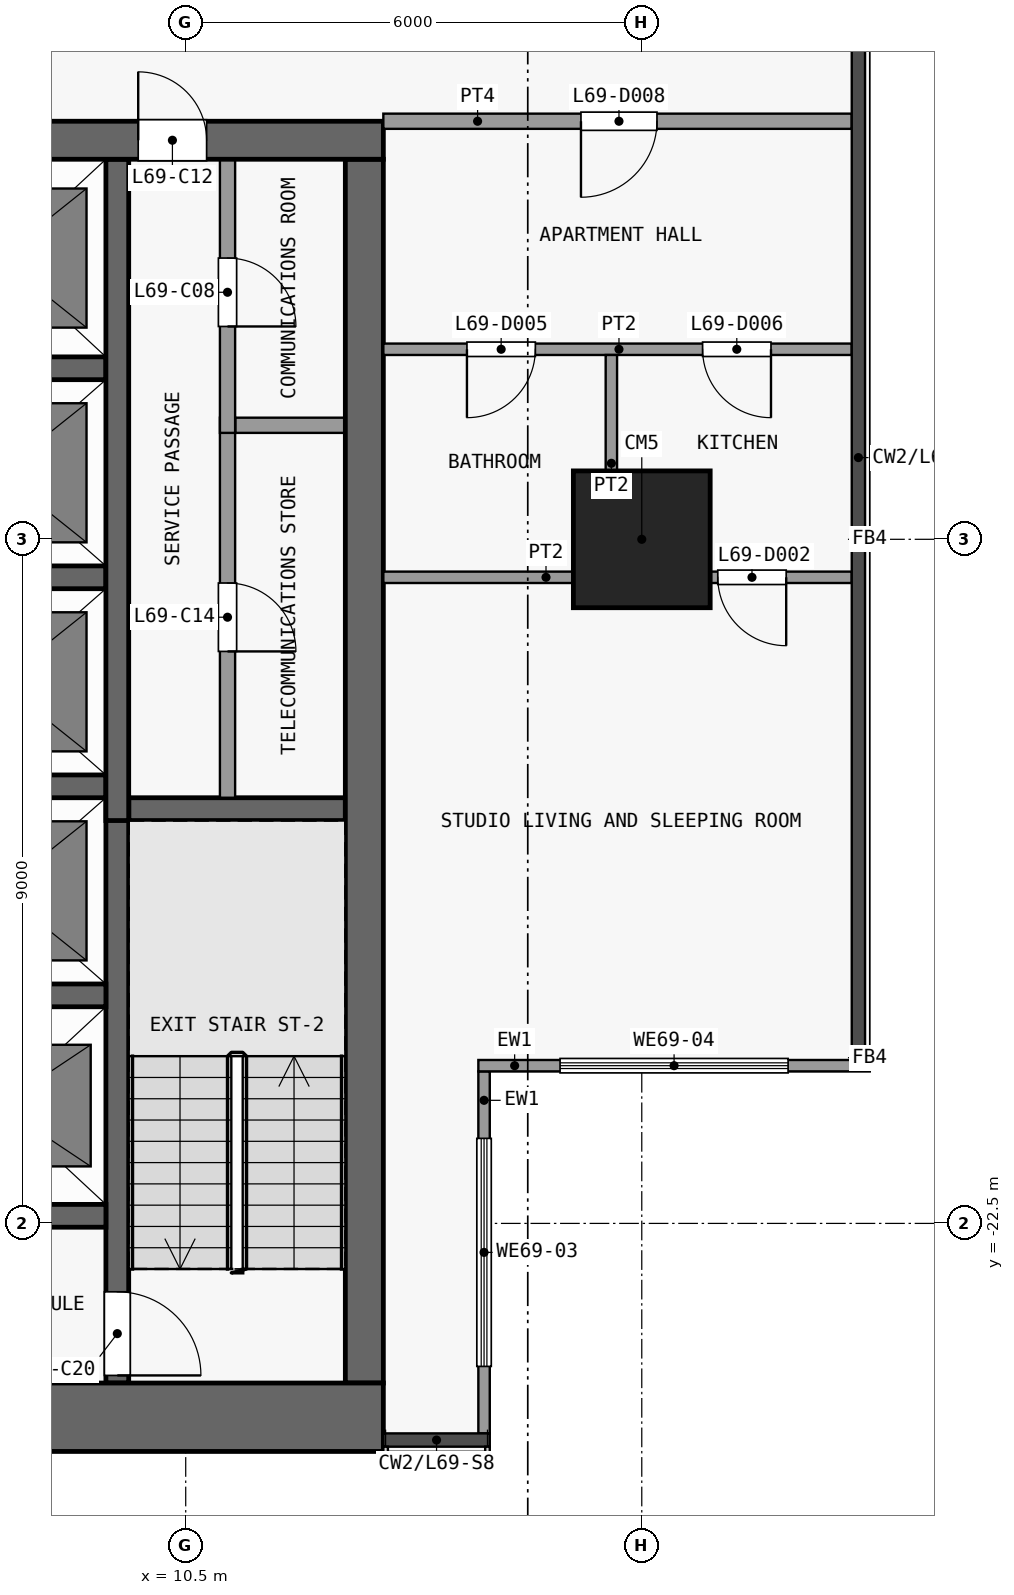
"""IFC4 building model, lengths in metres.
Left out: names, types, materials, properties, quantities, classifications, styles, units other than length and angle.
Written with IfcOpenShell. Run it as: python <this file> out.ifc"""

import sys

from ifc_helpers import new_model, si_unit, direction, frame, frame_2d, origin, origin_2d, place, context, subcontext, project, spatial, rectangle, extrude, element, fill, save


model = new_model("IFC4")
c1 = context("Model", 3, precision=1e-05, world=origin(), true_north=direction((0.0, 1.0)))
c2 = subcontext(c1, "Body", "Model", "MODEL_VIEW")
j1 = project(units=[si_unit("LENGTHUNIT", "METRE"), si_unit("PLANEANGLEUNIT", "RADIAN")], contexts=[c1])
p1 = place(None, origin())
s1 = spatial("IfcSite", under=j1, at=p1, CompositionType="ELEMENT")
p2 = place(p1, origin())
s2 = spatial("IfcBuilding", under=s1, at=p2, CompositionType="ELEMENT")
p3 = place(p2, frame((0.0, 0.0, 273.5)))
s3 = spatial("IfcBuildingStorey", under=s2, at=p3, CompositionType="ELEMENT", Elevation=273.5)
p4 = place(p3, frame((16.5, -13.5, 0.0), z_axis=(0.0, 0.0, 1.0), x_axis=(1.0, 0.0, 0.0)))
e1 = element("IfcColumn", 1, at=p4, inside=s3, PredefinedType="COLUMN", context=c2, shape_type="SweptSolid", body=[
    extrude(rectangle(XDim=1.8, YDim=1.8, at=origin_2d()), origin(), (0.0, 0.0, 1.0), 3.6),
])
p5 = place(p3, frame((-13.1, -25.05, 0.0), z_axis=(0.0, 0.0, 1.0), x_axis=(1.0, 0.0, 0.0)))
e2 = element("IfcWall", 2, at=p5, inside=s3, PredefinedType="SHEAR", context=c2, shape_type="SweptSolid", body=[
    extrude(rectangle(XDim=26.2, YDim=0.9, at=frame_2d((13.1, 0.0))), origin(), (0.0, 0.0, 1.0), 3.3),
])
p6 = place(p3, frame((-13.1, -8.25, 0.0), z_axis=(0.0, 0.0, 1.0), x_axis=(1.0, 0.0, 0.0)))
e3 = element("IfcWall", 3, at=p6, inside=s3, PredefinedType="SHEAR", context=c2, shape_type="SweptSolid", body=[
    extrude(rectangle(XDim=26.2, YDim=0.5, at=frame_2d((13.1, 0.0))), origin(), (0.0, 0.0, 1.0), 3.3),
])
p7 = place(p6, frame((7.4, 0.0, 0.0)))
e4 = element("IfcOpeningElement", 4, at=p7, cuts=e3, PredefinedType="OPENING", context=c2, shape_type="SweptSolid", body=[
    extrude(rectangle(XDim=1.8, YDim=2.1, at=frame_2d((0.9, 1.05))), frame((0.0, 0.26, 0.0), z_axis=(0.0, -1.0, 0.0), x_axis=(1.0, 0.0, 0.0)), (0.0, 0.0, 1.0), 0.52),
])
p8 = place(p6, frame((17.0, 0.0, 0.0)))
e5 = element("IfcOpeningElement", 5, at=p8, cuts=e3, PredefinedType="OPENING", context=c2, shape_type="SweptSolid", body=[
    extrude(rectangle(XDim=1.8, YDim=2.1, at=frame_2d((0.9, 1.05))), frame((0.0, 0.26, 0.0), z_axis=(0.0, -1.0, 0.0), x_axis=(1.0, 0.0, 0.0)), (0.0, 0.0, 1.0), 0.52),
])
p9 = place(p6, frame((2.325, 0.0, 0.0)))
e6 = element("IfcOpeningElement", 6, at=p9, cuts=e3, PredefinedType="OPENING", context=c2, shape_type="SweptSolid", body=[
    extrude(rectangle(XDim=0.9, YDim=2.1, at=frame_2d((0.45, 1.05))), frame((0.0, 0.26, 0.0), z_axis=(0.0, -1.0, 0.0), x_axis=(1.0, 0.0, 0.0)), (0.0, 0.0, 1.0), 0.52),
])
p10 = place(p6, frame((22.975, 0.0, 0.0)))
e7 = element("IfcOpeningElement", 7, at=p10, cuts=e3, PredefinedType="OPENING", context=c2, shape_type="SweptSolid", body=[
    extrude(rectangle(XDim=0.9, YDim=2.1, at=frame_2d((0.45, 1.05))), frame((0.0, 0.26, 0.0), z_axis=(0.0, -1.0, 0.0), x_axis=(1.0, 0.0, 0.0)), (0.0, 0.0, 1.0), 0.52),
])
p11 = place(p3, frame((12.85, -24.6, 0.0), z_axis=(0.0, 0.0, 1.0), x_axis=(0.0, 1.0, 0.0)))
e8 = element("IfcWall", 8, at=p11, inside=s3, PredefinedType="SHEAR", context=c2, shape_type="SweptSolid", body=[
    extrude(rectangle(XDim=16.1, YDim=0.5, at=frame_2d((8.05, 0.0))), origin(), (0.0, 0.0, 1.0), 3.3),
])
for number, where, z_axis, x_axis in (
    (9, (6.65, -22.4, 0.0), (0.0, 0.0, 1.0), (1.0, 0.0, 0.0)),
    (10, (6.65, -19.5, 0.0), (0.0, 0.0, 1.0), (1.0, 0.0, 0.0)),
):
    element("IfcWall", number, at=place(p3, frame(where, z_axis=z_axis, x_axis=x_axis)), inside=s3, PredefinedType="SHEAR", context=c2, shape_type="SweptSolid", body=[
        extrude(rectangle(XDim=2.8, YDim=0.3, at=frame_2d((1.4, 0.0))), origin(), (0.0, 0.0, 1.0), 3.3),
    ])
p12 = place(p3, frame((9.75, -17.05, 0.0), z_axis=(0.0, 0.0, 1.0), x_axis=(1.0, 0.0, 0.0)))
e11 = element("IfcWall", 11, at=p12, inside=s3, PredefinedType="SHEAR", context=c2, shape_type="SweptSolid", body=[
    extrude(rectangle(XDim=2.85, YDim=0.3, at=frame_2d((1.425, 0.0))), origin(), (0.0, 0.0, 1.0), 3.3),
])
for number, where, z_axis, x_axis in (
    (12, (6.65, -16.75, 0.0), (0.0, 0.0, 1.0), (1.0, 0.0, 0.0)),
    (13, (6.65, -14.0, 0.0), (0.0, 0.0, 1.0), (1.0, 0.0, 0.0)),
):
    element("IfcWall", number, at=place(p3, frame(where, z_axis=z_axis, x_axis=x_axis)), inside=s3, PredefinedType="SHEAR", context=c2, shape_type="SweptSolid", body=[
        extrude(rectangle(XDim=2.8, YDim=0.3, at=frame_2d((1.4, 0.0))), origin(), (0.0, 0.0, 1.0), 3.3),
    ])
p13 = place(p3, frame((11.15, -12.0, 0.0), z_axis=(0.0, 0.0, 1.0), x_axis=(1.0, 0.0, 0.0)))
e14 = element("IfcWall", 14, at=p13, inside=s3, PredefinedType="PARTITIONING", context=c2, shape_type="SweptSolid", body=[
    extrude(rectangle(XDim=1.45, YDim=0.2, at=frame_2d((0.725, 0.0))), origin(), (0.0, 0.0, 1.0), 3.3),
])
p14 = place(p3, frame((6.65, -11.25, 0.0), z_axis=(0.0, 0.0, 1.0), x_axis=(1.0, 0.0, 0.0)))
e15 = element("IfcWall", 15, at=p14, inside=s3, PredefinedType="SHEAR", context=c2, shape_type="SweptSolid", body=[
    extrude(rectangle(XDim=2.8, YDim=0.3, at=frame_2d((1.4, 0.0))), origin(), (0.0, 0.0, 1.0), 3.3),
])
p15 = place(p3, frame((9.6, -16.9, 0.0), z_axis=(0.0, 0.0, 1.0), x_axis=(0.0, -1.0, 0.0)))
e16 = element("IfcWall", 16, at=p15, inside=s3, PredefinedType="SHEAR", context=c2, shape_type="SweptSolid", body=[
    extrude(rectangle(XDim=7.7, YDim=0.3, at=frame_2d((3.85, 0.0))), origin(), (0.0, 0.0, 1.0), 3.3),
])
p16 = place(p15, frame((6.5, 0.0, 0.0)))
e17 = element("IfcOpeningElement", 17, at=p16, cuts=e16, PredefinedType="OPENING", context=c2, shape_type="SweptSolid", body=[
    extrude(rectangle(XDim=1.1, YDim=2.1, at=frame_2d((0.55, 1.05))), frame((0.0, 0.16, 0.0), z_axis=(0.0, -1.0, 0.0), x_axis=(1.0, 0.0, 0.0)), (0.0, 0.0, 1.0), 0.32),
])
p17 = place(p3, frame((9.6, -17.2, 0.0), z_axis=(0.0, 0.0, 1.0), x_axis=(0.0, 1.0, 0.0)))
e18 = element("IfcWall", 18, at=p17, inside=s3, PredefinedType="SHEAR", context=c2, shape_type="SweptSolid", body=[
    extrude(rectangle(XDim=8.7, YDim=0.3, at=frame_2d((4.35, 0.0))), origin(), (0.0, 0.0, 1.0), 3.3),
])
p18 = place(p3, frame((11.05, -11.9, 0.0), z_axis=(0.0, 0.0, 1.0), x_axis=(0.0, -1.0, 0.0)))
e19 = element("IfcWall", 19, at=p18, inside=s3, PredefinedType="PARTITIONING", context=c2, shape_type="SweptSolid", body=[
    extrude(rectangle(XDim=5.0, YDim=0.2, at=frame_2d((2.5, 0.0))), origin(), (0.0, 0.0, 1.0), 3.3),
])
p19 = place(p18, frame((2.175, 0.0, 0.0)))
e20 = element("IfcOpeningElement", 20, at=p19, cuts=e19, PredefinedType="OPENING", context=c2, shape_type="SweptSolid", body=[
    extrude(rectangle(XDim=0.9, YDim=2.1, at=frame_2d((0.45, 1.05))), frame((0.0, 0.11, 0.0), z_axis=(0.0, -1.0, 0.0), x_axis=(1.0, 0.0, 0.0)), (0.0, 0.0, 1.0), 0.22),
])
p20 = place(p3, frame((11.05, -8.5, 0.0), z_axis=(0.0, 0.0, 1.0), x_axis=(0.0, -1.0, 0.0)))
e21 = element("IfcWall", 21, at=p20, inside=s3, PredefinedType="PARTITIONING", context=c2, shape_type="SweptSolid", body=[
    extrude(rectangle(XDim=3.6, YDim=0.2, at=frame_2d((1.8, 0.0))), origin(), (0.0, 0.0, 1.0), 3.3),
])
p21 = place(p20, frame((1.3, 0.0, 0.0)))
e22 = element("IfcOpeningElement", 22, at=p21, cuts=e21, PredefinedType="OPENING", context=c2, shape_type="SweptSolid", body=[
    extrude(rectangle(XDim=0.9, YDim=2.1, at=frame_2d((0.45, 1.05))), frame((0.0, 0.11, 0.0), z_axis=(0.0, -1.0, 0.0), x_axis=(1.0, 0.0, 0.0)), (0.0, 0.0, 1.0), 0.22),
])
p22 = place(p3, frame((14.425, -20.5, 0.0), z_axis=(0.0, 0.0, 1.0), x_axis=(0.0, -1.0, 0.0)))
e23 = element("IfcWall", 23, at=p22, inside=s3, PredefinedType="SOLIDWALL", context=c2, shape_type="SweptSolid", body=[
    extrude(rectangle(XDim=4.762, YDim=0.15, at=frame_2d((2.381, 0.0))), origin(), (0.0, 0.0, 1.0), 3.3),
])
p23 = place(p22, frame((0.881, 0.0, 0.9)))
e24 = element("IfcOpeningElement", 24, at=p23, cuts=e23, PredefinedType="OPENING", context=c2, shape_type="SweptSolid", body=[
    extrude(rectangle(XDim=3.0, YDim=2.4, at=frame_2d((1.5, 1.2))), frame((0.0, 0.085, 0.0), z_axis=(0.0, -1.0, 0.0), x_axis=(1.0, 0.0, 0.0)), (0.0, 0.0, 1.0), 0.17),
])
p24 = place(p3, frame((19.5, -20.425, 0.0), z_axis=(0.0, 0.0, 1.0), x_axis=(-1.0, 0.0, 0.0)))
e25 = element("IfcWall", 25, at=p24, inside=s3, PredefinedType="SOLIDWALL", context=c2, shape_type="SweptSolid", body=[
    extrude(rectangle(XDim=5.15, YDim=0.15, at=frame_2d((2.575, 0.0))), origin(), (0.0, 0.0, 1.0), 3.3),
])
p25 = place(p24, frame((1.075, 0.0, 0.9)))
e26 = element("IfcOpeningElement", 26, at=p25, cuts=e25, PredefinedType="OPENING", context=c2, shape_type="SweptSolid", body=[
    extrude(rectangle(XDim=3.0, YDim=2.4, at=frame_2d((1.5, 1.2))), frame((0.0, 0.085, 0.0), z_axis=(0.0, -1.0, 0.0), x_axis=(1.0, 0.0, 0.0)), (0.0, 0.0, 1.0), 0.17),
])
p26 = place(p3, frame((13.1, -14.0, 0.0), z_axis=(0.0, 0.0, 1.0), x_axis=(1.0, 0.0, 0.0)))
e27 = element("IfcWall", 27, at=p26, inside=s3, PredefinedType="PARTITIONING", context=c2, shape_type="SweptSolid", body=[
    extrude(rectangle(XDim=6.162, YDim=0.15, at=frame_2d((3.081, 0.0))), origin(), (0.0, 0.0, 1.0), 3.3),
])
p27 = place(p26, frame((4.4, 0.0, 0.0)))
e28 = element("IfcOpeningElement", 28, at=p27, cuts=e27, PredefinedType="OPENING", context=c2, shape_type="SweptSolid", body=[
    extrude(rectangle(XDim=0.9, YDim=2.1, at=frame_2d((0.45, 1.05))), frame((0.0, 0.085, 0.0), z_axis=(0.0, -1.0, 0.0), x_axis=(1.0, 0.0, 0.0)), (0.0, 0.0, 1.0), 0.17),
])
p28 = place(p3, frame((13.1, -11.0, 0.0), z_axis=(0.0, 0.0, 1.0), x_axis=(1.0, 0.0, 0.0)))
e29 = element("IfcWall", 29, at=p28, inside=s3, PredefinedType="PARTITIONING", context=c2, shape_type="SweptSolid", body=[
    extrude(rectangle(XDim=6.162, YDim=0.15, at=frame_2d((3.081, 0.0))), origin(), (0.0, 0.0, 1.0), 3.3),
])
p29 = place(p28, frame((1.1, 0.0, 0.0)))
e30 = element("IfcOpeningElement", 30, at=p29, cuts=e29, PredefinedType="OPENING", context=c2, shape_type="SweptSolid", body=[
    extrude(rectangle(XDim=0.9, YDim=2.1, at=frame_2d((0.45, 1.05))), frame((0.0, 0.085, 0.0), z_axis=(0.0, -1.0, 0.0), x_axis=(1.0, 0.0, 0.0)), (0.0, 0.0, 1.0), 0.17),
])
p30 = place(p28, frame((4.2, 0.0, 0.0)))
e31 = element("IfcOpeningElement", 31, at=p30, cuts=e29, PredefinedType="OPENING", context=c2, shape_type="SweptSolid", body=[
    extrude(rectangle(XDim=0.9, YDim=2.1, at=frame_2d((0.45, 1.05))), frame((0.0, 0.085, 0.0), z_axis=(0.0, -1.0, 0.0), x_axis=(1.0, 0.0, 0.0)), (0.0, 0.0, 1.0), 0.17),
])
p31 = place(p3, frame((13.1, -8.0, 0.0), z_axis=(0.0, 0.0, 1.0), x_axis=(1.0, 0.0, 0.0)))
e32 = element("IfcWall", 32, at=p31, inside=s3, PredefinedType="PARTITIONING", context=c2, shape_type="SweptSolid", body=[
    extrude(rectangle(XDim=6.162, YDim=0.2, at=frame_2d((3.081, 0.0))), origin(), (0.0, 0.0, 1.0), 3.3),
])
p32 = place(p31, frame((2.6, 0.0, 0.0)))
e33 = element("IfcOpeningElement", 33, at=p32, cuts=e32, PredefinedType="OPENING", context=c2, shape_type="SweptSolid", body=[
    extrude(rectangle(XDim=1.0, YDim=2.1, at=frame_2d((0.5, 1.05))), frame((0.0, 0.11, 0.0), z_axis=(0.0, -1.0, 0.0), x_axis=(1.0, 0.0, 0.0)), (0.0, 0.0, 1.0), 0.22),
])
p33 = place(p3, frame((16.1, -13.925, 0.0), z_axis=(0.0, 0.0, 1.0), x_axis=(0.0, 1.0, 0.0)))
e34 = element("IfcWall", 34, at=p33, inside=s3, PredefinedType="PARTITIONING", context=c2, shape_type="SweptSolid", body=[
    extrude(rectangle(XDim=2.85, YDim=0.15, at=frame_2d((1.425, 0.0))), origin(), (0.0, 0.0, 1.0), 3.3),
])
p34 = place(p21, origin())
e35 = element("IfcDoor", 35, at=p34, inside=s3, OperationType="SINGLE_SWING_RIGHT", PredefinedType="DOOR", context=c2, shape_type="SweptSolid", body=[
    extrude(rectangle(XDim=0.9, YDim=2.1, at=frame_2d((0.45, 1.05))), frame((0.0, 0.025, 0.0), z_axis=(0.0, -1.0, 0.0), x_axis=(1.0, 0.0, 0.0)), (0.0, 0.0, 1.0), 0.05),
])
fill(e22, e35)
p35 = place(p10, origin())
e36 = element("IfcDoor", 36, at=p35, inside=s3, OperationType="SINGLE_SWING_LEFT", PredefinedType="DOOR", context=c2, shape_type="SweptSolid", body=[
    extrude(rectangle(XDim=0.9, YDim=2.1, at=frame_2d((0.45, 1.05))), frame((0.0, 0.025, 0.0), z_axis=(0.0, -1.0, 0.0), x_axis=(1.0, 0.0, 0.0)), (0.0, 0.0, 1.0), 0.05),
])
fill(e7, e36)
p36 = place(p19, origin())
e37 = element("IfcDoor", 37, at=p36, inside=s3, OperationType="SINGLE_SWING_RIGHT", PredefinedType="DOOR", context=c2, shape_type="SweptSolid", body=[
    extrude(rectangle(XDim=0.9, YDim=2.1, at=frame_2d((0.45, 1.05))), frame((0.0, 0.025, 0.0), z_axis=(0.0, -1.0, 0.0), x_axis=(1.0, 0.0, 0.0)), (0.0, 0.0, 1.0), 0.05),
])
fill(e20, e37)
p37 = place(p16, origin())
e38 = element("IfcDoor", 38, at=p37, inside=s3, OperationType="SINGLE_SWING_RIGHT", PredefinedType="DOOR", context=c2, shape_type="SweptSolid", body=[
    extrude(rectangle(XDim=1.1, YDim=2.1, at=frame_2d((0.55, 1.05))), frame((0.0, 0.025, 0.0), z_axis=(0.0, -1.0, 0.0), x_axis=(1.0, 0.0, 0.0)), (0.0, 0.0, 1.0), 0.05),
])
fill(e17, e38)
p38 = place(p23, origin())
e39 = element("IfcWindow", 39, at=p38, inside=s3, PartitioningType="SINGLE_PANEL", PredefinedType="WINDOW", context=c2, shape_type="SweptSolid", body=[
    extrude(rectangle(XDim=3.0, YDim=2.4, at=frame_2d((1.5, 1.2))), frame((0.0, 0.03, 0.0), z_axis=(0.0, -1.0, 0.0), x_axis=(1.0, 0.0, 0.0)), (0.0, 0.0, 1.0), 0.06),
])
fill(e24, e39)
p39 = place(p25, origin())
e40 = element("IfcWindow", 40, at=p39, inside=s3, PartitioningType="SINGLE_PANEL", PredefinedType="WINDOW", context=c2, shape_type="SweptSolid", body=[
    extrude(rectangle(XDim=3.0, YDim=2.4, at=frame_2d((1.5, 1.2))), frame((0.0, 0.03, 0.0), z_axis=(0.0, -1.0, 0.0), x_axis=(1.0, 0.0, 0.0)), (0.0, 0.0, 1.0), 0.06),
])
fill(e26, e40)
p40 = place(p27, origin())
e41 = element("IfcDoor", 41, at=p40, inside=s3, OperationType="SINGLE_SWING_RIGHT", PredefinedType="DOOR", context=c2, shape_type="SweptSolid", body=[
    extrude(rectangle(XDim=0.9, YDim=2.1, at=frame_2d((0.45, 1.05))), frame((0.0, 0.025, 0.0), z_axis=(0.0, -1.0, 0.0), x_axis=(1.0, 0.0, 0.0)), (0.0, 0.0, 1.0), 0.05),
])
fill(e28, e41)
p41 = place(p29, origin())
e42 = element("IfcDoor", 42, at=p41, inside=s3, OperationType="SINGLE_SWING_LEFT", PredefinedType="DOOR", context=c2, shape_type="SweptSolid", body=[
    extrude(rectangle(XDim=0.9, YDim=2.1, at=frame_2d((0.45, 1.05))), frame((0.0, 0.025, 0.0), z_axis=(0.0, -1.0, 0.0), x_axis=(1.0, 0.0, 0.0)), (0.0, 0.0, 1.0), 0.05),
])
fill(e30, e42)
p42 = place(p30, origin())
e43 = element("IfcDoor", 43, at=p42, inside=s3, OperationType="SINGLE_SWING_RIGHT", PredefinedType="DOOR", context=c2, shape_type="SweptSolid", body=[
    extrude(rectangle(XDim=0.9, YDim=2.1, at=frame_2d((0.45, 1.05))), frame((0.0, 0.025, 0.0), z_axis=(0.0, -1.0, 0.0), x_axis=(1.0, 0.0, 0.0)), (0.0, 0.0, 1.0), 0.05),
])
fill(e31, e43)
p43 = place(p32, origin())
e44 = element("IfcDoor", 44, at=p43, inside=s3, OperationType="SINGLE_SWING_LEFT", PredefinedType="DOOR", context=c2, shape_type="SweptSolid", body=[
    extrude(rectangle(XDim=1.0, YDim=2.1, at=frame_2d((0.5, 1.05))), frame((0.0, 0.025, 0.0), z_axis=(0.0, -1.0, 0.0), x_axis=(1.0, 0.0, 0.0)), (0.0, 0.0, 1.0), 0.05),
])
fill(e33, e44)
save(model, sys.argv[1])
